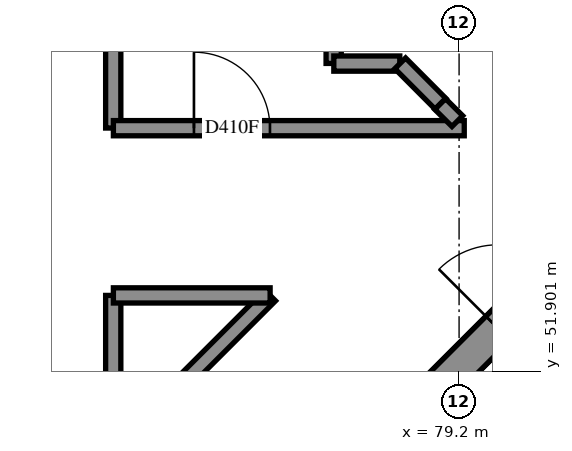
"""IFC4 building model, lengths in metres.
Left out: names, types, materials, properties, quantities, classifications, styles, units other than length and angle.
Written with IfcOpenShell. Run it as: python <this file> out.ifc"""

import sys

from ifc_helpers import new_model, si_unit, direction, frame, frame_2d, origin, place, context, subcontext, project, spatial, polyline, rectangle, outline, extrude, element, fill, save


model = new_model("IFC4")
c1 = context("Model", 3, precision=1e-05, world=origin(), true_north=direction((0.0, 1.0)))
c2 = subcontext(c1, "Body", "Model", "MODEL_VIEW")
j1 = project(units=[si_unit("LENGTHUNIT", "METRE"), si_unit("PLANEANGLEUNIT", "RADIAN")], contexts=[c1])
p1 = place(None, origin())
s1 = spatial("IfcSite", under=j1, at=p1, CompositionType="ELEMENT")
p2 = place(p1, origin())
s2 = spatial("IfcBuilding", under=s1, at=p2, CompositionType="ELEMENT")
p3 = place(p2, frame((0.0, 0.0, 234.6)))
s3 = spatial("IfcBuildingStorey", under=s2, at=p3, CompositionType="ELEMENT", Elevation=234.6)
p4 = place(p3, frame((76.495, 49.249, -0.3), z_axis=(0.0, 0.0, 1.0), x_axis=(0.7071067812, 0.7071067812, 0.0)))
e1 = element("IfcWall", 1, at=p4, inside=s3, PredefinedType="SHEAR", context=c2, shape_type="SweptSolid", body=[
    extrude(rectangle(XDim=14.4, YDim=0.45, at=frame_2d((7.2, 0.0))), origin(), (0.0, 0.0, 1.0), 4.3),
])
p5 = place(p4, frame((4.55, 0.0, 0.3)))
e2 = element("IfcOpeningElement", 2, at=p5, cuts=e1, PredefinedType="OPENING", context=c2, shape_type="SweptSolid", body=[
    extrude(rectangle(XDim=1.1, YDim=2.1, at=frame_2d((0.55, 1.05))), frame((0.0, 0.235, 0.0), z_axis=(0.0, -1.0, 0.0), x_axis=(1.0, 0.0, 0.0)), (0.0, 0.0, 1.0), 0.47),
])
p6 = place(p4, frame((11.35, 0.0, 0.3)))
e3 = element("IfcOpeningElement", 3, at=p6, cuts=e1, PredefinedType="OPENING", context=c2, shape_type="SweptSolid", body=[
    extrude(rectangle(XDim=1.1, YDim=2.1, at=frame_2d((0.55, 1.05))), frame((0.0, 0.235, 0.0), z_axis=(0.0, -1.0, 0.0), x_axis=(1.0, 0.0, 0.0)), (0.0, 0.0, 1.0), 0.47),
])
p7 = place(p3, frame((102.747, 49.938, 0.0), z_axis=(0.0, 0.0, 1.0), x_axis=(-0.7071083109, 0.7071052514, 0.0)))
e4 = element("IfcWall", 4, at=p7, inside=s3, PredefinedType="SOLIDWALL", context=c2, shape_type="SweptSolid", body=[
    extrude(outline(polyline([(-0.1, -0.1), (32.726, -0.1), (32.644, 0.1), (0.1, 0.1), (-0.1, -0.1)])), origin(), (0.0, 0.0, 1.0), 4.7),
])
p8 = place(p3, frame((74.65, 55.102, 0.0), z_axis=(0.0, 0.0, 1.0), x_axis=(0.0, 1.0, 0.0)))
e5 = element("IfcWall", 5, at=p8, inside=s3, PredefinedType="PARTITIONING", context=c2, shape_type="SweptSolid", body=[
    extrude(rectangle(XDim=4.616, YDim=0.2, at=frame_2d((2.308, 0.0))), origin(), (0.0, 0.0, 1.0), 4.7),
])
p9 = place(p3, frame((74.652, 55.1, 0.0), z_axis=(0.0, 0.0, 1.0), x_axis=(1.0, 0.0, 0.0)))
e6 = element("IfcWall", 6, at=p9, inside=s3, PredefinedType="PARTITIONING", context=c2, shape_type="SweptSolid", body=[
    extrude(rectangle(XDim=4.616, YDim=0.2, at=frame_2d((2.308, 0.0))), origin(), (0.0, 0.0, 1.0), 4.7),
])
p10 = place(p9, frame((1.06, 0.0, 0.0)))
e7 = element("IfcOpeningElement", 7, at=p10, cuts=e6, PredefinedType="OPENING", context=c2, shape_type="SweptSolid", body=[
    extrude(rectangle(XDim=1.0, YDim=2.1, at=frame_2d((0.5, 1.05))), frame((0.0, 0.11, 0.0), z_axis=(0.0, -1.0, 0.0), x_axis=(1.0, 0.0, 0.0)), (0.0, 0.0, 1.0), 0.22),
])
p11 = place(p3, frame((74.651, 50.835, 0.0), z_axis=(0.0, 0.0, 1.0), x_axis=(0.7071067812, 0.7071067812, 0.0)))
e8 = element("IfcWall", 8, at=p11, inside=s3, PredefinedType="PARTITIONING", context=c2, shape_type="SweptSolid", body=[
    extrude(rectangle(XDim=2.919, YDim=0.2, at=frame_2d((1.459, 0.0))), origin(), (0.0, 0.0, 1.0), 4.7),
])
p12 = place(p3, frame((74.65, 50.836, 0.0), z_axis=(0.0, 0.0, 1.0), x_axis=(0.0, 1.0, 0.0)))
e9 = element("IfcWall", 9, at=p12, inside=s3, PredefinedType="PARTITIONING", context=c2, shape_type="SweptSolid", body=[
    extrude(rectangle(XDim=2.064, YDim=0.2, at=frame_2d((1.032, 0.0))), origin(), (0.0, 0.0, 1.0), 4.7),
])
p13 = place(p3, frame((74.652, 52.9, 0.0), z_axis=(0.0, 0.0, 1.0), x_axis=(1.0, 0.0, 0.0)))
e10 = element("IfcWall", 10, at=p13, inside=s3, PredefinedType="PARTITIONING", context=c2, shape_type="SweptSolid", body=[
    extrude(rectangle(XDim=2.062, YDim=0.2, at=frame_2d((1.031, 0.0))), origin(), (0.0, 0.0, 1.0), 4.7),
])
for number, where, z_axis, x_axis in (
    (11, (77.55, 55.952, 0.0), (0.0, 0.0, 1.0), (0.0, 1.0, 0.0)),
    (12, (77.552, 55.95, 0.0), (0.0, 0.0, 1.0), (1.0, 0.0, 0.0)),
):
    element("IfcWall", number, at=place(p3, frame(where, z_axis=z_axis, x_axis=x_axis)), inside=s3, PredefinedType="PARTITIONING", context=c2, shape_type="SweptSolid", body=[
        extrude(rectangle(XDim=0.868, YDim=0.2, at=frame_2d((0.434, 0.0))), origin(), (0.0, 0.0, 1.0), 4.7),
    ])
p14 = place(p3, frame((78.425, 55.953, 0.0), z_axis=(0.0, 0.0, 1.0), x_axis=(0.7057738785, -0.7084371761, 0.0)))
e13 = element("IfcWall", 13, at=p14, inside=s3, PredefinedType="PARTITIONING", context=c2, shape_type="SweptSolid", body=[
    extrude(rectangle(XDim=0.751, YDim=0.2, at=frame_2d((0.376, 0.0))), origin(), (0.0, 0.0, 1.0), 4.7),
])
p15 = place(p3, frame((78.951, 55.417, 0.0), z_axis=(0.0, 0.0, 1.0), x_axis=(0.709302262, -0.7049044624, 0.0)))
e14 = element("IfcWall", 14, at=p15, inside=s3, PredefinedType="PARTITIONING", context=c2, shape_type="SweptSolid", body=[
    extrude(rectangle(XDim=0.318, YDim=0.2, at=frame_2d((0.159, 0.0))), origin(), (0.0, 0.0, 1.0), 4.7),
])
p16 = place(p10, origin())
e15 = element("IfcDoor", 15, at=p16, inside=s3, OperationType="SINGLE_SWING_LEFT", PredefinedType="DOOR", context=c2, shape_type="SweptSolid", body=[
    extrude(rectangle(XDim=1.0, YDim=2.1, at=frame_2d((0.5, 1.05))), frame((0.0, 0.025, 0.0), z_axis=(0.0, -1.0, 0.0), x_axis=(1.0, 0.0, 0.0)), (0.0, 0.0, 1.0), 0.05),
])
fill(e7, e15)
save(model, sys.argv[1])
